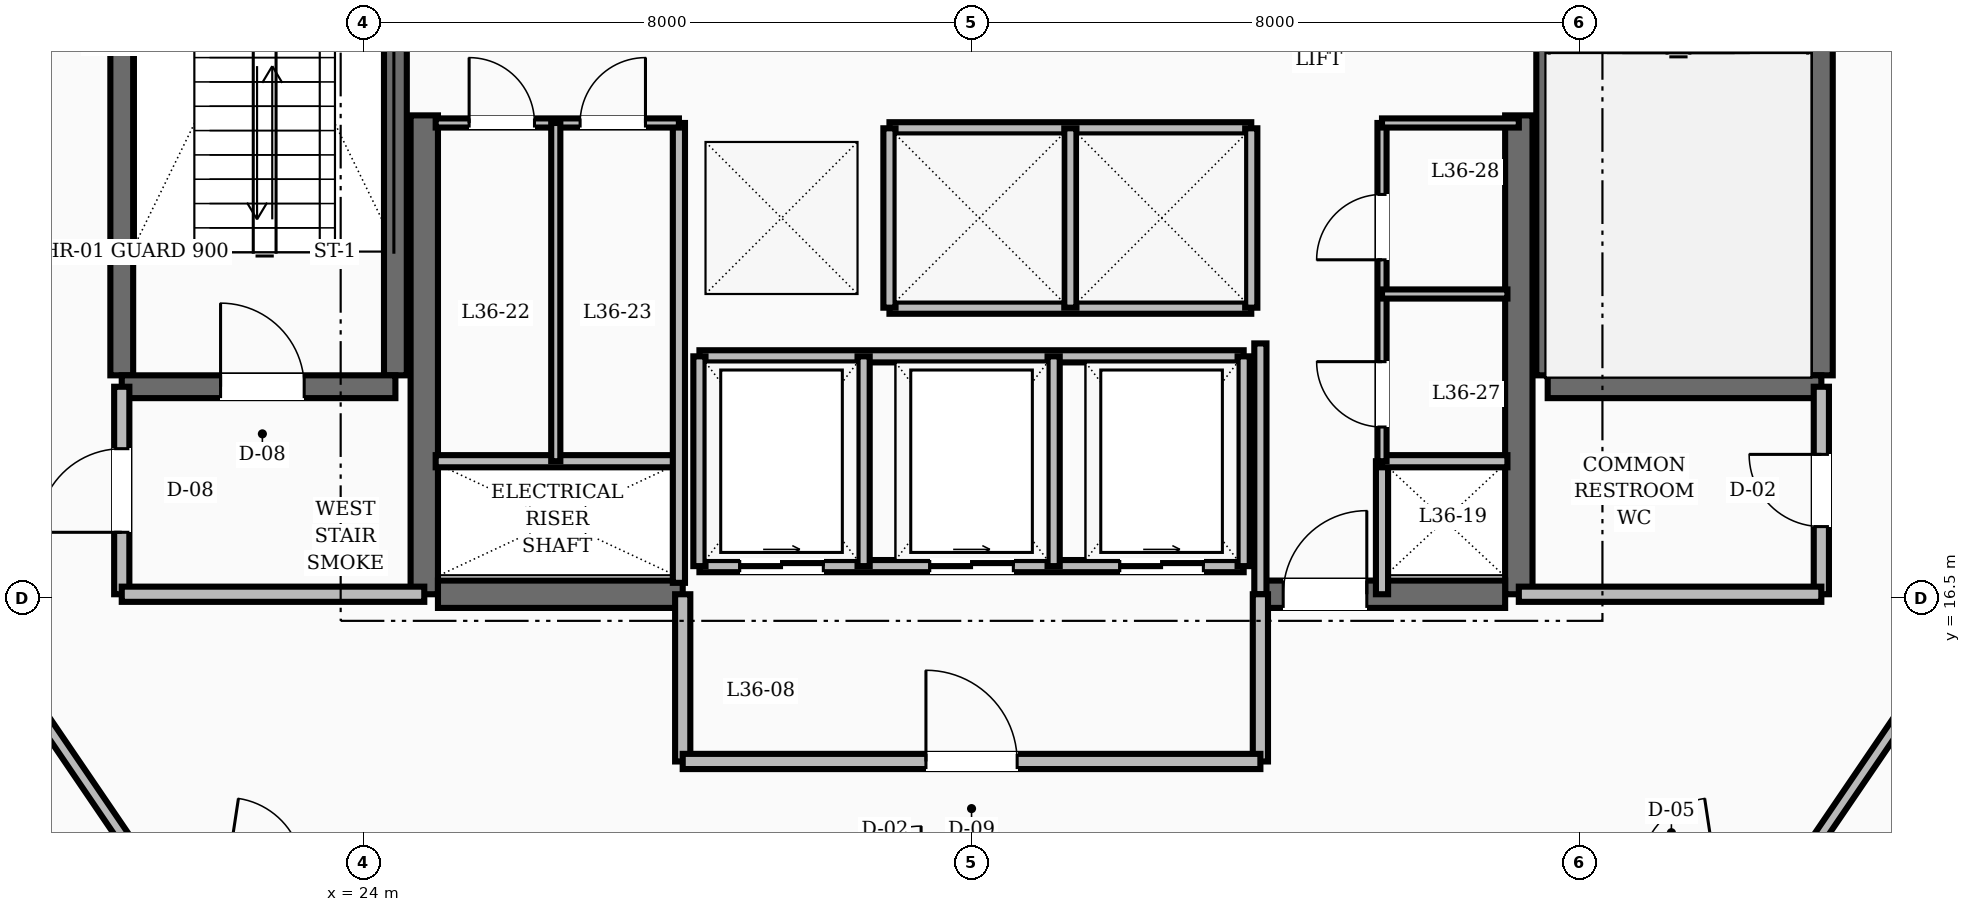
"""IFC4 building model, lengths in metres.
Left out: names, types, materials, properties, quantities, classifications, styles, units other than length and angle.
Written with IfcOpenShell. Run it as: python <this file> out.ifc"""

import sys

from ifc_helpers import new_model, si_unit, direction, frame, frame_2d, origin, place, context, subcontext, project, spatial, rectangle, extrude, element, fill, save


model = new_model("IFC4")
c1 = context("Model", 3, precision=1e-05, world=origin(), true_north=direction((0.0, 1.0)))
c2 = subcontext(c1, "Body", "Model", "MODEL_VIEW")
j1 = project(units=[si_unit("LENGTHUNIT", "METRE"), si_unit("PLANEANGLEUNIT", "RADIAN")], contexts=[c1])
p1 = place(None, origin())
s1 = spatial("IfcSite", under=j1, at=p1, CompositionType="ELEMENT")
p2 = place(p1, origin())
s2 = spatial("IfcBuilding", under=s1, at=p2, CompositionType="ELEMENT")
p3 = place(p2, frame((0.0, 0.0, 142.4)))
s3 = spatial("IfcBuildingStorey", under=s2, at=p3, CompositionType="ELEMENT", Elevation=142.4)
for number, where, z_axis, x_axis in (
    (1, (24.8, 16.55, 0.0), (0.0, 0.0, 1.0), (0.0, 1.0, 0.0)),
    (2, (39.2, 16.55, 0.0), (0.0, 0.0, 1.0), (0.0, 1.0, 0.0)),
):
    element("IfcWall", number, at=place(p3, frame(where, z_axis=z_axis, x_axis=x_axis)), inside=s3, PredefinedType="SHEAR", context=c2, shape_type="SweptSolid", body=[
        extrude(rectangle(XDim=6.3, YDim=0.36, at=frame_2d((3.15, 0.0))), origin(), (0.0, 0.0, 1.0), 3.6),
    ])
p4 = place(p3, frame((24.98, 16.55, 0.0), z_axis=(0.0, 0.0, 1.0), x_axis=(1.0, 0.0, 0.0)))
e3 = element("IfcWall", 3, at=p4, inside=s3, PredefinedType="SHEAR", context=c2, shape_type="SweptSolid", body=[
    extrude(rectangle(XDim=3.22, YDim=0.36, at=frame_2d((1.61, 0.0))), origin(), (0.0, 0.0, 1.0), 3.6),
])
p5 = place(p3, frame((35.8, 16.55, 0.0), z_axis=(0.0, 0.0, 1.0), x_axis=(1.0, 0.0, 0.0)))
e4 = element("IfcWall", 4, at=p5, inside=s3, PredefinedType="SHEAR", context=c2, shape_type="SweptSolid", body=[
    extrude(rectangle(XDim=3.22, YDim=0.36, at=frame_2d((1.61, 0.0))), origin(), (0.0, 0.0, 1.0), 3.6),
])
p6 = place(p5, frame((0.3, 0.0, 0.0)))
e5 = element("IfcOpeningElement", 5, at=p6, cuts=e4, PredefinedType="OPENING", context=c2, shape_type="SweptSolid", body=[
    extrude(rectangle(XDim=1.1, YDim=2.1, at=frame_2d((0.55, 1.05))), frame((0.0, 0.19, 0.0), z_axis=(0.0, -1.0, 0.0), x_axis=(1.0, 0.0, 0.0)), (0.0, 0.0, 1.0), 0.38),
])
for number, where, z_axis, x_axis in (
    (6, (20.82, 19.43, 0.0), (0.0, 0.0, 1.0), (0.0, 1.0, 0.0)),
    (7, (24.42, 19.43, 0.0), (0.0, 0.0, 1.0), (0.0, 1.0, 0.0)),
):
    element("IfcWall", number, at=place(p3, frame(where, z_axis=z_axis, x_axis=x_axis)), inside=s3, PredefinedType="SHEAR", context=c2, shape_type="SweptSolid", body=[
        extrude(rectangle(XDim=8.74, YDim=0.3, at=frame_2d((4.37, 0.0))), origin(), (0.0, 0.0, 1.0), 3.6),
    ])
p7 = place(p3, frame((20.82, 19.28, 0.0), z_axis=(0.0, 0.0, 1.0), x_axis=(1.0, 0.0, 0.0)))
e8 = element("IfcWall", 8, at=p7, inside=s3, PredefinedType="SHEAR", context=c2, shape_type="SweptSolid", body=[
    extrude(rectangle(XDim=3.6, YDim=0.3, at=frame_2d((1.8, 0.0))), origin(), (0.0, 0.0, 1.0), 3.6),
])
p8 = place(p7, frame((1.3, 0.0, 0.0)))
e9 = element("IfcOpeningElement", 9, at=p8, cuts=e8, PredefinedType="OPENING", context=c2, shape_type="SweptSolid", body=[
    extrude(rectangle(XDim=1.1, YDim=2.1, at=frame_2d((0.55, 1.05))), frame((0.0, 0.16, 0.0), z_axis=(0.0, -1.0, 0.0), x_axis=(1.0, 0.0, 0.0)), (0.0, 0.0, 1.0), 0.32),
])
for number, where, z_axis, x_axis in (
    (10, (43.18, 19.43, 0.0), (0.0, 0.0, 1.0), (0.0, 1.0, 0.0)),
    (11, (39.58, 19.43, 0.0), (0.0, 0.0, 1.0), (0.0, 1.0, 0.0)),
):
    element("IfcWall", number, at=place(p3, frame(where, z_axis=z_axis, x_axis=x_axis)), inside=s3, PredefinedType="SHEAR", context=c2, shape_type="SweptSolid", body=[
        extrude(rectangle(XDim=8.74, YDim=0.3, at=frame_2d((4.37, 0.0))), origin(), (0.0, 0.0, 1.0), 3.6),
    ])
p9 = place(p3, frame((39.58, 19.28, 0.0), z_axis=(0.0, 0.0, 1.0), x_axis=(1.0, 0.0, 0.0)))
e12 = element("IfcWall", 12, at=p9, inside=s3, PredefinedType="SHEAR", context=c2, shape_type="SweptSolid", body=[
    extrude(rectangle(XDim=3.6, YDim=0.3, at=frame_2d((1.8, 0.0))), origin(), (0.0, 0.0, 1.0), 3.6),
])
p10 = place(p3, frame((20.82, 16.55, 0.0), z_axis=(0.0, 0.0, 1.0), x_axis=(0.0, 1.0, 0.0)))
e13 = element("IfcWall", 13, at=p10, inside=s3, PredefinedType="SOLIDWALL", context=c2, shape_type="SweptSolid", body=[
    extrude(rectangle(XDim=2.73, YDim=0.2, at=frame_2d((1.365, 0.0))), origin(), (0.0, 0.0, 1.0), 2.8),
])
p11 = place(p10, frame((0.815, 0.0, 0.0)))
e14 = element("IfcOpeningElement", 14, at=p11, cuts=e13, PredefinedType="OPENING", context=c2, shape_type="SweptSolid", body=[
    extrude(rectangle(XDim=1.1, YDim=2.1, at=frame_2d((0.55, 1.05))), frame((0.0, 0.11, 0.0), z_axis=(0.0, -1.0, 0.0), x_axis=(1.0, 0.0, 0.0)), (0.0, 0.0, 1.0), 0.22),
])
p12 = place(p3, frame((20.82, 16.55, 0.0), z_axis=(0.0, 0.0, 1.0), x_axis=(1.0, 0.0, 0.0)))
e15 = element("IfcWall", 15, at=p12, inside=s3, PredefinedType="SOLIDWALL", context=c2, shape_type="SweptSolid", body=[
    extrude(rectangle(XDim=3.98, YDim=0.2, at=frame_2d((1.99, 0.0))), origin(), (0.0, 0.0, 1.0), 2.8),
])
p13 = place(p3, frame((43.18, 16.55, 0.0), z_axis=(0.0, 0.0, 1.0), x_axis=(0.0, 1.0, 0.0)))
e16 = element("IfcWall", 16, at=p13, inside=s3, PredefinedType="SOLIDWALL", context=c2, shape_type="SweptSolid", body=[
    extrude(rectangle(XDim=2.73, YDim=0.2, at=frame_2d((1.365, 0.0))), origin(), (0.0, 0.0, 1.0), 2.8),
])
p14 = place(p13, frame((0.89, 0.0, 0.0)))
e17 = element("IfcOpeningElement", 17, at=p14, cuts=e16, PredefinedType="OPENING", context=c2, shape_type="SweptSolid", body=[
    extrude(rectangle(XDim=0.95, YDim=2.1, at=frame_2d((0.475, 1.05))), frame((0.0, 0.11, 0.0), z_axis=(0.0, -1.0, 0.0), x_axis=(1.0, 0.0, 0.0)), (0.0, 0.0, 1.0), 0.22),
])
p15 = place(p3, frame((39.2, 16.55, 0.0), z_axis=(0.0, 0.0, 1.0), x_axis=(1.0, 0.0, 0.0)))
e18 = element("IfcWall", 18, at=p15, inside=s3, PredefinedType="SOLIDWALL", context=c2, shape_type="SweptSolid", body=[
    extrude(rectangle(XDim=3.98, YDim=0.2, at=frame_2d((1.99, 0.0))), origin(), (0.0, 0.0, 1.0), 2.8),
])
p16 = place(p3, frame((35.8, 16.55, 0.0), z_axis=(0.0, 0.0, 1.0), x_axis=(0.0, 1.0, 0.0)))
e19 = element("IfcWall", 19, at=p16, inside=s3, PredefinedType="SOLIDWALL", context=c2, shape_type="SweptSolid", body=[
    extrude(rectangle(XDim=3.3, YDim=0.16, at=frame_2d((1.65, 0.0))), origin(), (0.0, 0.0, 1.0), 2.8),
])
p17 = place(p3, frame((37.4, 16.55, 0.0), z_axis=(0.0, 0.0, 1.0), x_axis=(0.0, 1.0, 0.0)))
e20 = element("IfcWall", 20, at=p17, inside=s3, PredefinedType="SOLIDWALL", context=c2, shape_type="SweptSolid", body=[
    extrude(rectangle(XDim=1.75, YDim=0.16, at=frame_2d((0.875, 0.0))), origin(), (0.0, 0.0, 1.0), 2.8),
])
for number, where, z_axis, x_axis in (
    (21, (28.2, 14.35, 0.0), (0.0, 0.0, 1.0), (0.0, 1.0, 0.0)),
    (22, (35.8, 14.35, 0.0), (0.0, 0.0, 1.0), (0.0, 1.0, 0.0)),
):
    element("IfcWall", number, at=place(p3, frame(where, z_axis=z_axis, x_axis=x_axis)), inside=s3, PredefinedType="SOLIDWALL", context=c2, shape_type="SweptSolid", body=[
        extrude(rectangle(XDim=2.2, YDim=0.2, at=frame_2d((1.1, 0.0))), origin(), (0.0, 0.0, 1.0), 2.8),
    ])
p18 = place(p3, frame((28.2, 14.35, 0.0), z_axis=(0.0, 0.0, 1.0), x_axis=(1.0, 0.0, 0.0)))
e23 = element("IfcWall", 23, at=p18, inside=s3, PredefinedType="SOLIDWALL", context=c2, shape_type="SweptSolid", body=[
    extrude(rectangle(XDim=7.6, YDim=0.2, at=frame_2d((3.8, 0.0))), origin(), (0.0, 0.0, 1.0), 2.8),
])
p19 = place(p18, frame((3.2, 0.0, 0.0)))
e24 = element("IfcOpeningElement", 24, at=p19, cuts=e23, PredefinedType="OPENING", context=c2, shape_type="SweptSolid", body=[
    extrude(rectangle(XDim=1.2, YDim=2.1, at=frame_2d((0.6, 1.05))), frame((0.0, 0.11, 0.0), z_axis=(0.0, -1.0, 0.0), x_axis=(1.0, 0.0, 0.0)), (0.0, 0.0, 1.0), 0.22),
])
for number, where, z_axis, x_axis in (
    (25, (30.92, 22.68, 0.0), (0.0, 0.0, 1.0), (1.0, 0.0, 0.0)),
    (26, (30.92, 20.32, 0.0), (0.0, 0.0, 1.0), (1.0, 0.0, 0.0)),
):
    element("IfcWall", number, at=place(p3, frame(where, z_axis=z_axis, x_axis=x_axis)), inside=s3, PredefinedType="SOLIDWALL", context=c2, shape_type="SweptSolid", body=[
        extrude(rectangle(XDim=4.76, YDim=0.16, at=frame_2d((2.38, 0.0))), origin(), (0.0, 0.0, 1.0), 2.8),
    ])
for number, where, z_axis, x_axis in (
    (27, (30.92, 20.32, 0.0), (0.0, 0.0, 1.0), (0.0, 1.0, 0.0)),
    (28, (33.3, 20.32, 0.0), (0.0, 0.0, 1.0), (0.0, 1.0, 0.0)),
    (29, (35.68, 20.32, 0.0), (0.0, 0.0, 1.0), (0.0, 1.0, 0.0)),
):
    element("IfcWall", number, at=place(p3, frame(where, z_axis=z_axis, x_axis=x_axis)), inside=s3, PredefinedType="SOLIDWALL", context=c2, shape_type="SweptSolid", body=[
        extrude(rectangle(XDim=2.36, YDim=0.16, at=frame_2d((1.18, 0.0))), origin(), (0.0, 0.0, 1.0), 2.8),
    ])
p20 = place(p3, frame((28.42, 16.92, 0.0), z_axis=(0.0, 0.0, 1.0), x_axis=(1.0, 0.0, 0.0)))
e30 = element("IfcWall", 30, at=p20, inside=s3, PredefinedType="SOLIDWALL", context=c2, shape_type="SweptSolid", body=[
    extrude(rectangle(XDim=7.16, YDim=0.16, at=frame_2d((3.58, 0.0))), origin(), (0.0, 0.0, 1.0), 2.8),
])
p21 = place(p20, frame((0.53, 0.0, 0.0)))
e31 = element("IfcOpeningElement", 31, at=p21, cuts=e30, PredefinedType="OPENING", context=c2, shape_type="SweptSolid", body=[
    extrude(rectangle(XDim=1.1, YDim=2.15, at=frame_2d((0.55, 1.075))), frame((0.0, 0.09, 0.0), z_axis=(0.0, -1.0, 0.0), x_axis=(1.0, 0.0, 0.0)), (0.0, 0.0, 1.0), 0.18),
])
p22 = place(p20, frame((3.03, 0.0, 0.0)))
e32 = element("IfcOpeningElement", 32, at=p22, cuts=e30, PredefinedType="OPENING", context=c2, shape_type="SweptSolid", body=[
    extrude(rectangle(XDim=1.1, YDim=2.15, at=frame_2d((0.55, 1.075))), frame((0.0, 0.09, 0.0), z_axis=(0.0, -1.0, 0.0), x_axis=(1.0, 0.0, 0.0)), (0.0, 0.0, 1.0), 0.18),
])
p23 = place(p20, frame((5.53, 0.0, 0.0)))
e33 = element("IfcOpeningElement", 33, at=p23, cuts=e30, PredefinedType="OPENING", context=c2, shape_type="SweptSolid", body=[
    extrude(rectangle(XDim=1.1, YDim=2.15, at=frame_2d((0.55, 1.075))), frame((0.0, 0.09, 0.0), z_axis=(0.0, -1.0, 0.0), x_axis=(1.0, 0.0, 0.0)), (0.0, 0.0, 1.0), 0.18),
])
p24 = place(p3, frame((28.42, 19.68, 0.0), z_axis=(0.0, 0.0, 1.0), x_axis=(1.0, 0.0, 0.0)))
e34 = element("IfcWall", 34, at=p24, inside=s3, PredefinedType="SOLIDWALL", context=c2, shape_type="SweptSolid", body=[
    extrude(rectangle(XDim=7.16, YDim=0.16, at=frame_2d((3.58, 0.0))), origin(), (0.0, 0.0, 1.0), 2.8),
])
for number, where, z_axis, x_axis in (
    (35, (28.42, 16.92, 0.0), (0.0, 0.0, 1.0), (0.0, 1.0, 0.0)),
    (36, (30.58, 16.92, 0.0), (0.0, 0.0, 1.0), (0.0, 1.0, 0.0)),
    (37, (33.08, 16.92, 0.0), (0.0, 0.0, 1.0), (0.0, 1.0, 0.0)),
    (38, (35.58, 16.92, 0.0), (0.0, 0.0, 1.0), (0.0, 1.0, 0.0)),
):
    element("IfcWall", number, at=place(p3, frame(where, z_axis=z_axis, x_axis=x_axis)), inside=s3, PredefinedType="SOLIDWALL", context=c2, shape_type="SweptSolid", body=[
        extrude(rectangle(XDim=2.76, YDim=0.16, at=frame_2d((1.38, 0.0))), origin(), (0.0, 0.0, 1.0), 2.8),
    ])
p25 = place(p3, frame((24.95, 18.3, 0.0), z_axis=(0.0, 0.0, 1.0), x_axis=(1.0, 0.0, 0.0)))
e39 = element("IfcWall", 39, at=p25, inside=s3, PredefinedType="SOLIDWALL", context=c2, shape_type="SweptSolid", body=[
    extrude(rectangle(XDim=3.2, YDim=0.16, at=frame_2d((1.6, 0.0))), origin(), (0.0, 0.0, 1.0), 2.8),
])
p26 = place(p3, frame((28.15, 16.7, 0.0), z_axis=(0.0, 0.0, 1.0), x_axis=(0.0, 1.0, 0.0)))
e40 = element("IfcWall", 40, at=p26, inside=s3, PredefinedType="SOLIDWALL", context=c2, shape_type="SweptSolid", body=[
    extrude(rectangle(XDim=6.05, YDim=0.16, at=frame_2d((3.025, 0.0))), origin(), (0.0, 0.0, 1.0), 2.8),
])
p27 = place(p3, frame((37.4, 18.3, 0.0), z_axis=(0.0, 0.0, 1.0), x_axis=(1.0, 0.0, 0.0)))
e41 = element("IfcWall", 41, at=p27, inside=s3, PredefinedType="SOLIDWALL", context=c2, shape_type="SweptSolid", body=[
    extrude(rectangle(XDim=1.65, YDim=0.16, at=frame_2d((0.825, 0.0))), origin(), (0.0, 0.0, 1.0), 2.8),
])
p28 = place(p3, frame((24.95, 22.75, 0.0), z_axis=(0.0, 0.0, 1.0), x_axis=(1.0, 0.0, 0.0)))
e42 = element("IfcWall", 42, at=p28, inside=s3, PredefinedType="PARTITIONING", context=c2, shape_type="SweptSolid", body=[
    extrude(rectangle(XDim=3.2, YDim=0.12, at=frame_2d((1.6, 0.0))), origin(), (0.0, 0.0, 1.0), 2.8),
])
p29 = place(p28, frame((0.44, 0.0, 0.0)))
e43 = element("IfcOpeningElement", 43, at=p29, cuts=e42, PredefinedType="OPENING", context=c2, shape_type="SweptSolid", body=[
    extrude(rectangle(XDim=0.86, YDim=2.1, at=frame_2d((0.43, 1.05))), frame((0.0, 0.07, 0.0), z_axis=(0.0, -1.0, 0.0), x_axis=(1.0, 0.0, 0.0)), (0.0, 0.0, 1.0), 0.14),
])
p30 = place(p28, frame((1.9, 0.0, 0.0)))
e44 = element("IfcOpeningElement", 44, at=p30, cuts=e42, PredefinedType="OPENING", context=c2, shape_type="SweptSolid", body=[
    extrude(rectangle(XDim=0.86, YDim=2.1, at=frame_2d((0.43, 1.05))), frame((0.0, 0.07, 0.0), z_axis=(0.0, -1.0, 0.0), x_axis=(1.0, 0.0, 0.0)), (0.0, 0.0, 1.0), 0.14),
])
p31 = place(p3, frame((37.4, 18.3, 0.0), z_axis=(0.0, 0.0, 1.0), x_axis=(0.0, 1.0, 0.0)))
e45 = element("IfcWall", 45, at=p31, inside=s3, PredefinedType="PARTITIONING", context=c2, shape_type="SweptSolid", body=[
    extrude(rectangle(XDim=4.45, YDim=0.12, at=frame_2d((2.225, 0.0))), origin(), (0.0, 0.0, 1.0), 2.8),
])
p32 = place(p31, frame((0.45, 0.0, 0.0)))
e46 = element("IfcOpeningElement", 46, at=p32, cuts=e45, PredefinedType="OPENING", context=c2, shape_type="SweptSolid", body=[
    extrude(rectangle(XDim=0.86, YDim=2.1, at=frame_2d((0.43, 1.05))), frame((0.0, 0.07, 0.0), z_axis=(0.0, -1.0, 0.0), x_axis=(1.0, 0.0, 0.0)), (0.0, 0.0, 1.0), 0.14),
])
p33 = place(p31, frame((2.65, 0.0, 0.0)))
e47 = element("IfcOpeningElement", 47, at=p33, cuts=e45, PredefinedType="OPENING", context=c2, shape_type="SweptSolid", body=[
    extrude(rectangle(XDim=0.86, YDim=2.1, at=frame_2d((0.43, 1.05))), frame((0.0, 0.07, 0.0), z_axis=(0.0, -1.0, 0.0), x_axis=(1.0, 0.0, 0.0)), (0.0, 0.0, 1.0), 0.14),
])
p34 = place(p3, frame((37.4, 22.75, 0.0), z_axis=(0.0, 0.0, 1.0), x_axis=(1.0, 0.0, 0.0)))
e48 = element("IfcWall", 48, at=p34, inside=s3, PredefinedType="PARTITIONING", context=c2, shape_type="SweptSolid", body=[
    extrude(rectangle(XDim=1.8, YDim=0.12, at=frame_2d((0.9, 0.0))), origin(), (0.0, 0.0, 1.0), 2.8),
])
p35 = place(p3, frame((26.53, 18.3, 0.0), z_axis=(0.0, 0.0, 1.0), x_axis=(0.0, 1.0, 0.0)))
e49 = element("IfcWall", 49, at=p35, inside=s3, PredefinedType="PARTITIONING", context=c2, shape_type="SweptSolid", body=[
    extrude(rectangle(XDim=4.45, YDim=0.12, at=frame_2d((2.225, 0.0))), origin(), (0.0, 0.0, 1.0), 2.8),
])
p36 = place(p3, frame((37.4, 20.5, 0.0), z_axis=(0.0, 0.0, 1.0), x_axis=(1.0, 0.0, 0.0)))
e50 = element("IfcWall", 50, at=p36, inside=s3, PredefinedType="PARTITIONING", context=c2, shape_type="SweptSolid", body=[
    extrude(rectangle(XDim=1.65, YDim=0.12, at=frame_2d((0.825, 0.0))), origin(), (0.0, 0.0, 1.0), 2.8),
])
for number, where, z_axis, x_axis in (
    (51, (19.35, 15.548, 0.0), (0.0, 0.0, 1.0), (0.563, -0.827, 0.0)),
    (52, (42.95, 13.05, 0.0), (0.0, 0.0, 1.0), (0.563, 0.827, 0.0)),
):
    element("IfcWall", number, at=place(p3, frame(where, z_axis=z_axis, x_axis=x_axis)), inside=s3, PredefinedType="SOLIDWALL", context=c2, shape_type="SweptSolid", body=[
        extrude(rectangle(XDim=3.021, YDim=0.16, at=frame_2d((1.511, 0.0))), origin(), (0.0, 0.0, 1.0), 2.8),
    ])
p37 = place(p8, origin())
e53 = element("IfcDoor", 53, at=p37, inside=s3, OperationType="SINGLE_SWING_LEFT", PredefinedType="DOOR", context=c2, shape_type="SweptSolid", body=[
    extrude(rectangle(XDim=1.1, YDim=2.1, at=frame_2d((0.55, 1.05))), frame((0.0, 0.025, 0.0), z_axis=(0.0, -1.0, 0.0), x_axis=(1.0, 0.0, 0.0)), (0.0, 0.0, 1.0), 0.05),
])
fill(e9, e53)
p38 = place(p11, origin())
e54 = element("IfcDoor", 54, at=p38, inside=s3, OperationType="SINGLE_SWING_LEFT", PredefinedType="DOOR", context=c2, shape_type="SweptSolid", body=[
    extrude(rectangle(XDim=1.1, YDim=2.1, at=frame_2d((0.55, 1.05))), frame((0.0, 0.025, 0.0), z_axis=(0.0, -1.0, 0.0), x_axis=(1.0, 0.0, 0.0)), (0.0, 0.0, 1.0), 0.05),
])
fill(e14, e54)
p39 = place(p14, origin())
e55 = element("IfcDoor", 55, at=p39, inside=s3, OperationType="SINGLE_SWING_RIGHT", PredefinedType="DOOR", context=c2, shape_type="SweptSolid", body=[
    extrude(rectangle(XDim=0.95, YDim=2.1, at=frame_2d((0.475, 1.05))), frame((0.0, 0.025, 0.0), z_axis=(0.0, -1.0, 0.0), x_axis=(1.0, 0.0, 0.0)), (0.0, 0.0, 1.0), 0.05),
])
fill(e17, e55)
p40 = place(p6, origin())
e56 = element("IfcDoor", 56, at=p40, inside=s3, OperationType="SINGLE_SWING_RIGHT", PredefinedType="DOOR", context=c2, shape_type="SweptSolid", body=[
    extrude(rectangle(XDim=1.1, YDim=2.1, at=frame_2d((0.55, 1.05))), frame((0.0, 0.025, 0.0), z_axis=(0.0, -1.0, 0.0), x_axis=(1.0, 0.0, 0.0)), (0.0, 0.0, 1.0), 0.05),
])
fill(e5, e56)
p41 = place(p19, origin())
e57 = element("IfcDoor", 57, at=p41, inside=s3, OperationType="SINGLE_SWING_LEFT", PredefinedType="DOOR", context=c2, shape_type="SweptSolid", body=[
    extrude(rectangle(XDim=1.2, YDim=2.1, at=frame_2d((0.6, 1.05))), frame((0.0, 0.025, 0.0), z_axis=(0.0, -1.0, 0.0), x_axis=(1.0, 0.0, 0.0)), (0.0, 0.0, 1.0), 0.05),
])
fill(e24, e57)
p42 = place(p21, origin())
e58 = element("IfcDoor", 58, at=p42, inside=s3, OperationType="SLIDING_TO_RIGHT", PredefinedType="DOOR", context=c2, shape_type="SweptSolid", body=[
    extrude(rectangle(XDim=1.1, YDim=2.15, at=frame_2d((0.55, 1.075))), frame((0.0, 0.025, 0.0), z_axis=(0.0, -1.0, 0.0), x_axis=(1.0, 0.0, 0.0)), (0.0, 0.0, 1.0), 0.05),
])
fill(e31, e58)
p43 = place(p22, origin())
e59 = element("IfcDoor", 59, at=p43, inside=s3, OperationType="SLIDING_TO_RIGHT", PredefinedType="DOOR", context=c2, shape_type="SweptSolid", body=[
    extrude(rectangle(XDim=1.1, YDim=2.15, at=frame_2d((0.55, 1.075))), frame((0.0, 0.025, 0.0), z_axis=(0.0, -1.0, 0.0), x_axis=(1.0, 0.0, 0.0)), (0.0, 0.0, 1.0), 0.05),
])
fill(e32, e59)
p44 = place(p23, origin())
e60 = element("IfcDoor", 60, at=p44, inside=s3, OperationType="SLIDING_TO_RIGHT", PredefinedType="DOOR", context=c2, shape_type="SweptSolid", body=[
    extrude(rectangle(XDim=1.1, YDim=2.15, at=frame_2d((0.55, 1.075))), frame((0.0, 0.025, 0.0), z_axis=(0.0, -1.0, 0.0), x_axis=(1.0, 0.0, 0.0)), (0.0, 0.0, 1.0), 0.05),
])
fill(e33, e60)
p45 = place(p29, origin())
e61 = element("IfcDoor", 61, at=p45, inside=s3, OperationType="SINGLE_SWING_LEFT", PredefinedType="DOOR", context=c2, shape_type="SweptSolid", body=[
    extrude(rectangle(XDim=0.86, YDim=2.1, at=frame_2d((0.43, 1.05))), frame((0.0, 0.025, 0.0), z_axis=(0.0, -1.0, 0.0), x_axis=(1.0, 0.0, 0.0)), (0.0, 0.0, 1.0), 0.05),
])
fill(e43, e61)
p46 = place(p30, origin())
e62 = element("IfcDoor", 62, at=p46, inside=s3, OperationType="SINGLE_SWING_RIGHT", PredefinedType="DOOR", context=c2, shape_type="SweptSolid", body=[
    extrude(rectangle(XDim=0.86, YDim=2.1, at=frame_2d((0.43, 1.05))), frame((0.0, 0.025, 0.0), z_axis=(0.0, -1.0, 0.0), x_axis=(1.0, 0.0, 0.0)), (0.0, 0.0, 1.0), 0.05),
])
fill(e44, e62)
p47 = place(p32, origin())
e63 = element("IfcDoor", 63, at=p47, inside=s3, OperationType="SINGLE_SWING_RIGHT", PredefinedType="DOOR", context=c2, shape_type="SweptSolid", body=[
    extrude(rectangle(XDim=0.86, YDim=2.1, at=frame_2d((0.43, 1.05))), frame((0.0, 0.025, 0.0), z_axis=(0.0, -1.0, 0.0), x_axis=(1.0, 0.0, 0.0)), (0.0, 0.0, 1.0), 0.05),
])
fill(e46, e63)
p48 = place(p33, origin())
e64 = element("IfcDoor", 64, at=p48, inside=s3, OperationType="SINGLE_SWING_LEFT", PredefinedType="DOOR", context=c2, shape_type="SweptSolid", body=[
    extrude(rectangle(XDim=0.86, YDim=2.1, at=frame_2d((0.43, 1.05))), frame((0.0, 0.025, 0.0), z_axis=(0.0, -1.0, 0.0), x_axis=(1.0, 0.0, 0.0)), (0.0, 0.0, 1.0), 0.05),
])
fill(e47, e64)
save(model, sys.argv[1])
